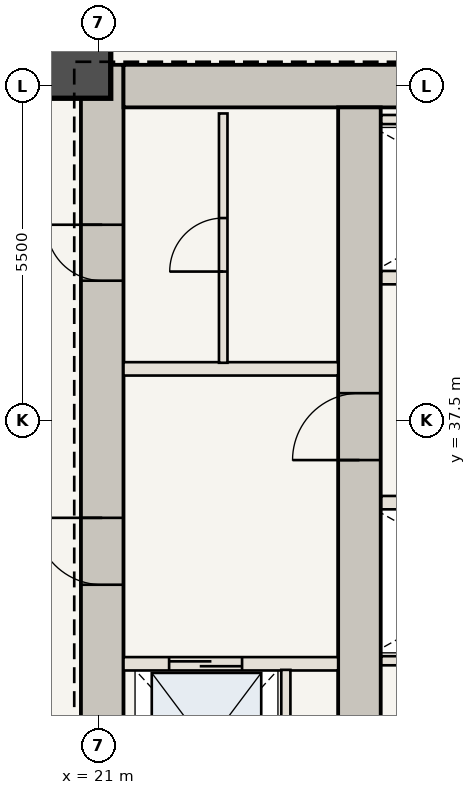
"""IFC4 building model, lengths in metres.
Left out: names, types, materials, properties, quantities, classifications, styles, units other than length and angle.
Written with IfcOpenShell. Run it as: python <this file> out.ifc"""

import sys

from ifc_helpers import new_model, si_unit, direction, frame, frame_2d, origin, origin_2d, place, context, subcontext, project, spatial, rectangle, extrude, element, fill, save


model = new_model("IFC4")
c1 = context("Model", 3, precision=1e-05, world=origin(), true_north=direction((0.0, 1.0)))
c2 = subcontext(c1, "Body", "Model", "MODEL_VIEW")
j1 = project(units=[si_unit("LENGTHUNIT", "METRE"), si_unit("PLANEANGLEUNIT", "RADIAN")], contexts=[c1])
p1 = place(None, origin())
s1 = spatial("IfcSite", under=j1, at=p1, CompositionType="ELEMENT")
p2 = place(p1, origin())
s2 = spatial("IfcBuilding", under=s1, at=p2, CompositionType="ELEMENT")
p3 = place(p2, frame((0.0, 0.0, 73.85)))
s3 = spatial("IfcBuildingStorey", under=s2, at=p3, CompositionType="ELEMENT", Elevation=73.85)
p4 = place(p3, frame((21.06, 30.6, 0.0), z_axis=(0.0, 0.0, 1.0), x_axis=(0.0, 1.0, 0.0)))
e1 = element("IfcWall", 1, at=p4, inside=s3, PredefinedType="SHEAR", context=c2, shape_type="SweptSolid", body=[
    extrude(rectangle(XDim=12.75, YDim=0.7, at=frame_2d((6.375, 0.0))), origin(), (0.0, 0.0, 1.0), 3.5),
])
p5 = place(p4, frame((4.2, 0.0, 0.0)))
e2 = element("IfcOpeningElement", 2, at=p5, cuts=e1, PredefinedType="OPENING", context=c2, shape_type="SweptSolid", body=[
    extrude(rectangle(XDim=1.1, YDim=2.15, at=frame_2d((0.55, 1.075))), frame((0.0, 0.36, 0.0), z_axis=(0.0, -1.0, 0.0), x_axis=(1.0, 0.0, 0.0)), (0.0, 0.0, 1.0), 0.72),
])
p6 = place(p4, frame((9.2, 0.0, 0.0)))
e3 = element("IfcOpeningElement", 3, at=p6, cuts=e1, PredefinedType="OPENING", context=c2, shape_type="SweptSolid", body=[
    extrude(rectangle(XDim=0.92, YDim=2.1, at=frame_2d((0.46, 1.05))), frame((0.0, 0.36, 0.0), z_axis=(0.0, -1.0, 0.0), x_axis=(1.0, 0.0, 0.0)), (0.0, 0.0, 1.0), 0.72),
])
p7 = place(p3, frame((21.41, 43.0, 0.0), z_axis=(0.0, 0.0, 1.0), x_axis=(1.0, 0.0, 0.0)))
e4 = element("IfcWall", 4, at=p7, inside=s3, PredefinedType="SHEAR", context=c2, shape_type="SweptSolid", body=[
    extrude(rectangle(XDim=8.24, YDim=0.7, at=frame_2d((4.12, 0.0))), origin(), (0.0, 0.0, 1.0), 3.5),
])
p8 = place(p3, frame((25.29, 30.6, 0.0), z_axis=(0.0, 0.0, 1.0), x_axis=(0.0, 1.0, 0.0)))
e5 = element("IfcWall", 5, at=p8, inside=s3, PredefinedType="SHEAR", context=c2, shape_type="SweptSolid", body=[
    extrude(rectangle(XDim=12.05, YDim=0.7, at=frame_2d((6.025, 0.0))), origin(), (0.0, 0.0, 1.0), 3.5),
])
p9 = place(p8, frame((6.25, 0.0, 0.0)))
e6 = element("IfcOpeningElement", 6, at=p9, cuts=e5, PredefinedType="OPENING", context=c2, shape_type="SweptSolid", body=[
    extrude(rectangle(XDim=1.1, YDim=2.15, at=frame_2d((0.55, 1.075))), frame((0.0, 0.36, 0.0), z_axis=(0.0, -1.0, 0.0), x_axis=(1.0, 0.0, 0.0)), (0.0, 0.0, 1.0), 0.72),
])
p10 = place(p3, frame((20.65, 43.35, 0.0), z_axis=(0.0, 0.0, 1.0), x_axis=(1.0, 0.0, 0.0)))
e7 = element("IfcColumn", 7, at=p10, inside=s3, PredefinedType="COLUMN", context=c2, shape_type="SweptSolid", body=[
    extrude(rectangle(XDim=1.1, YDim=1.1, at=origin_2d()), origin(), (0.0, 0.0, 1.0), 3.5),
])
p11 = place(p3, frame((21.41, 33.5, 0.0), z_axis=(0.0, 0.0, 1.0), x_axis=(1.0, 0.0, 0.0)))
e8 = element("IfcWall", 8, at=p11, inside=s3, PredefinedType="STANDARD", context=c2, shape_type="SweptSolid", body=[
    extrude(rectangle(XDim=3.53, YDim=0.22, at=frame_2d((1.765, 0.0))), origin(), (0.0, 0.0, 1.0), 3.24),
])
p12 = place(p11, frame((0.75, 0.0, 0.0)))
e9 = element("IfcOpeningElement", 9, at=p12, cuts=e8, PredefinedType="OPENING", context=c2, shape_type="SweptSolid", body=[
    extrude(rectangle(XDim=1.2, YDim=2.2, at=frame_2d((0.6, 1.1))), frame((0.0, 0.12, 0.0), z_axis=(0.0, -1.0, 0.0), x_axis=(1.0, 0.0, 0.0)), (0.0, 0.0, 1.0), 0.24),
])
p13 = place(p3, frame((24.08, 30.75, 0.0), z_axis=(0.0, 0.0, 1.0), x_axis=(0.0, 1.0, 0.0)))
e10 = element("IfcWall", 10, at=p13, inside=s3, PredefinedType="STANDARD", context=c2, shape_type="SweptSolid", body=[
    extrude(rectangle(XDim=2.65, YDim=0.15, at=frame_2d((1.325, 0.0))), origin(), (0.0, 0.0, 1.0), 3.24),
])
p14 = place(p3, frame((21.41, 38.35, 0.0), z_axis=(0.0, 0.0, 1.0), x_axis=(1.0, 0.0, 0.0)))
e11 = element("IfcWall", 11, at=p14, inside=s3, PredefinedType="STANDARD", context=c2, shape_type="SweptSolid", body=[
    extrude(rectangle(XDim=3.53, YDim=0.22, at=frame_2d((1.765, 0.0))), origin(), (0.0, 0.0, 1.0), 3.24),
])
p15 = place(p3, frame((23.05, 38.45, 0.0), z_axis=(0.0, 0.0, 1.0), x_axis=(0.0, 1.0, 0.0)))
e12 = element("IfcWall", 12, at=p15, inside=s3, PredefinedType="STANDARD", context=c2, shape_type="SweptSolid", body=[
    extrude(rectangle(XDim=4.1, YDim=0.14, at=frame_2d((2.05, 0.0))), origin(), (0.0, 0.0, 1.0), 3.24),
])
p16 = place(p15, frame((1.5, 0.0, 0.0)))
e13 = element("IfcOpeningElement", 13, at=p16, cuts=e12, PredefinedType="OPENING", context=c2, shape_type="SweptSolid", body=[
    extrude(rectangle(XDim=0.88, YDim=2.1, at=frame_2d((0.44, 1.05))), frame((0.0, 0.08, 0.0), z_axis=(0.0, -1.0, 0.0), x_axis=(1.0, 0.0, 0.0)), (0.0, 0.0, 1.0), 0.16),
])
p17 = place(p3, frame((25.65, 36.15, 0.0), z_axis=(0.0, 0.0, 1.0), x_axis=(1.0, 0.0, 0.0)))
e14 = element("IfcWall", 14, at=p17, inside=s3, PredefinedType="STANDARD", context=c2, shape_type="SweptSolid", body=[
    extrude(rectangle(XDim=4.3, YDim=0.22, at=frame_2d((2.15, 0.0))), origin(), (0.0, 0.0, 1.0), 3.24),
])
p18 = place(p3, frame((25.65, 33.55, 0.0), z_axis=(0.0, 0.0, 1.0), x_axis=(1.0, 0.0, 0.0)))
e15 = element("IfcWall", 15, at=p18, inside=s3, PredefinedType="STANDARD", context=c2, shape_type="SweptSolid", body=[
    extrude(rectangle(XDim=4.2, YDim=0.15, at=frame_2d((2.1, 0.0))), origin(), (0.0, 0.0, 1.0), 3.24),
])
p19 = place(p3, frame((25.65, 39.85, 0.0), z_axis=(0.0, 0.0, 1.0), x_axis=(1.0, 0.0, 0.0)))
e16 = element("IfcWall", 16, at=p19, inside=s3, PredefinedType="STANDARD", context=c2, shape_type="SweptSolid", body=[
    extrude(rectangle(XDim=4.3, YDim=0.22, at=frame_2d((2.15, 0.0))), origin(), (0.0, 0.0, 1.0), 3.24),
])
p20 = place(p3, frame((25.65, 42.45, 0.0), z_axis=(0.0, 0.0, 1.0), x_axis=(1.0, 0.0, 0.0)))
e17 = element("IfcWall", 17, at=p20, inside=s3, PredefinedType="STANDARD", context=c2, shape_type="SweptSolid", body=[
    extrude(rectangle(XDim=4.2, YDim=0.15, at=frame_2d((2.1, 0.0))), origin(), (0.0, 0.0, 1.0), 3.24),
])
p21 = place(p5, origin())
e18 = element("IfcDoor", 18, at=p21, inside=s3, OperationType="SINGLE_SWING_RIGHT", PredefinedType="DOOR", context=c2, shape_type="SweptSolid", body=[
    extrude(rectangle(XDim=1.1, YDim=2.15, at=frame_2d((0.55, 1.075))), frame((0.0, 0.025, 0.0), z_axis=(0.0, -1.0, 0.0), x_axis=(1.0, 0.0, 0.0)), (0.0, 0.0, 1.0), 0.05),
])
fill(e2, e18)
p22 = place(p9, origin())
e19 = element("IfcDoor", 19, at=p22, inside=s3, OperationType="SINGLE_SWING_LEFT", PredefinedType="DOOR", context=c2, shape_type="SweptSolid", body=[
    extrude(rectangle(XDim=1.1, YDim=2.15, at=frame_2d((0.55, 1.075))), frame((0.0, 0.025, 0.0), z_axis=(0.0, -1.0, 0.0), x_axis=(1.0, 0.0, 0.0)), (0.0, 0.0, 1.0), 0.05),
])
fill(e6, e19)
p23 = place(p6, origin())
e20 = element("IfcDoor", 20, at=p23, inside=s3, OperationType="SINGLE_SWING_RIGHT", PredefinedType="DOOR", context=c2, shape_type="SweptSolid", body=[
    extrude(rectangle(XDim=0.92, YDim=2.1, at=frame_2d((0.46, 1.05))), frame((0.0, 0.025, 0.0), z_axis=(0.0, -1.0, 0.0), x_axis=(1.0, 0.0, 0.0)), (0.0, 0.0, 1.0), 0.05),
])
fill(e3, e20)
p24 = place(p12, origin())
e21 = element("IfcDoor", 21, at=p24, inside=s3, OperationType="DOUBLE_DOOR_SLIDING", PredefinedType="DOOR", context=c2, shape_type="SweptSolid", body=[
    extrude(rectangle(XDim=1.2, YDim=2.2, at=frame_2d((0.6, 1.1))), frame((0.0, 0.025, 0.0), z_axis=(0.0, -1.0, 0.0), x_axis=(1.0, 0.0, 0.0)), (0.0, 0.0, 1.0), 0.05),
])
fill(e9, e21)
p25 = place(p16, origin())
e22 = element("IfcDoor", 22, at=p25, inside=s3, OperationType="SINGLE_SWING_LEFT", PredefinedType="DOOR", context=c2, shape_type="SweptSolid", body=[
    extrude(rectangle(XDim=0.88, YDim=2.1, at=frame_2d((0.44, 1.05))), frame((0.0, 0.025, 0.0), z_axis=(0.0, -1.0, 0.0), x_axis=(1.0, 0.0, 0.0)), (0.0, 0.0, 1.0), 0.05),
])
fill(e13, e22)
save(model, sys.argv[1])
